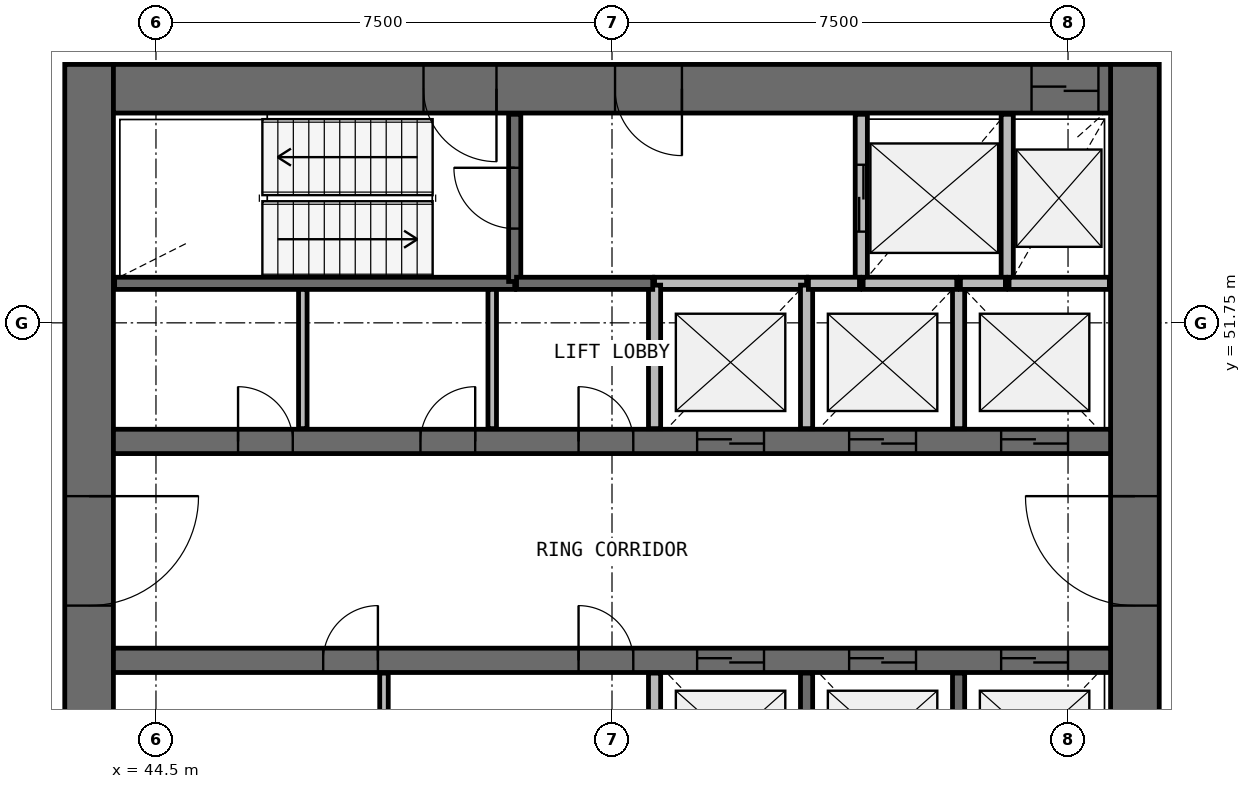
"""IFC4 building model, lengths in metres.
Left out: names, types, materials, properties, quantities, classifications, styles, units other than length and angle.
Written with IfcOpenShell. Run it as: python <this file> out.ifc"""

import sys

from ifc_helpers import new_model, si_unit, direction, frame, frame_2d, origin, place, context, subcontext, project, spatial, rectangle, extrude, source, transform, mapped, element, fill, save


model = new_model("IFC4")
c1 = context("Model", 3, precision=1e-05, world=origin(), true_north=direction((0.0, 1.0)))
c2 = subcontext(c1, "Body", "Model", "MODEL_VIEW")
j1 = project(units=[si_unit("LENGTHUNIT", "METRE"), si_unit("PLANEANGLEUNIT", "RADIAN")], contexts=[c1])
p1 = place(None, origin())
s1 = spatial("IfcSite", under=j1, at=p1, CompositionType="ELEMENT")
p2 = place(p1, origin())
s2 = spatial("IfcBuilding", under=s1, at=p2, CompositionType="ELEMENT")
p3 = place(p2, frame((0.0, 0.0, 144.8)))
s3 = spatial("IfcBuildingStorey", under=s2, at=p3, CompositionType="ELEMENT", Elevation=144.8)
p4 = place(p3, frame((60.6, 40.0, 0.0), z_axis=(0.0, 0.0, 1.0), x_axis=(0.0, 1.0, 0.0)))
e1 = element("IfcWall", 1, at=p4, inside=s3, PredefinedType="SHEAR", context=c2, shape_type="SweptSolid", body=[
    extrude(rectangle(XDim=16.0, YDim=0.8, at=frame_2d((8.0, 0.0))), origin(), (0.0, 0.0, 1.0), 3.9),
])
p5 = place(p4, frame((7.1, 0.0, 0.0)))
e2 = element("IfcOpeningElement", 2, at=p5, cuts=e1, PredefinedType="OPENING", context=c2, shape_type="SweptSolid", body=[
    extrude(rectangle(XDim=1.8, YDim=2.1, at=frame_2d((0.9, 1.05))), frame((0.0, 0.41, 0.0), z_axis=(0.0, -1.0, 0.0), x_axis=(1.0, 0.0, 0.0)), (0.0, 0.0, 1.0), 0.82),
])
p6 = place(p3, frame((43.4, 56.0, 0.0), z_axis=(0.0, 0.0, 1.0), x_axis=(0.0, -1.0, 0.0)))
e3 = element("IfcWall", 3, at=p6, inside=s3, PredefinedType="SHEAR", context=c2, shape_type="SweptSolid", body=[
    extrude(rectangle(XDim=16.0, YDim=0.8, at=frame_2d((8.0, 0.0))), origin(), (0.0, 0.0, 1.0), 3.9),
])
p7 = place(p6, frame((7.1, 0.0, 0.0)))
e4 = element("IfcOpeningElement", 4, at=p7, cuts=e3, PredefinedType="OPENING", context=c2, shape_type="SweptSolid", body=[
    extrude(rectangle(XDim=1.8, YDim=2.1, at=frame_2d((0.9, 1.05))), frame((0.0, 0.41, 0.0), z_axis=(0.0, -1.0, 0.0), x_axis=(1.0, 0.0, 0.0)), (0.0, 0.0, 1.0), 0.82),
])
p8 = place(p3, frame((60.2, 55.6, 0.0), z_axis=(0.0, 0.0, 1.0), x_axis=(-1.0, 0.0, 0.0)))
e5 = element("IfcWall", 5, at=p8, inside=s3, PredefinedType="SHEAR", context=c2, shape_type="SweptSolid", body=[
    extrude(rectangle(XDim=16.4, YDim=0.8, at=frame_2d((8.2, 0.0))), origin(), (0.0, 0.0, 1.0), 3.9),
])
p9 = place(p8, frame((0.2, 0.0, 0.0)))
e6 = element("IfcOpeningElement", 6, at=p9, cuts=e5, PredefinedType="OPENING", context=c2, shape_type="SweptSolid", body=[
    extrude(rectangle(XDim=1.1, YDim=2.1, at=frame_2d((0.55, 1.05))), frame((0.0, 0.41, 0.0), z_axis=(0.0, -1.0, 0.0), x_axis=(1.0, 0.0, 0.0)), (0.0, 0.0, 1.0), 0.82),
])
p10 = place(p8, frame((10.1, 0.0, 0.0)))
e7 = element("IfcOpeningElement", 7, at=p10, cuts=e5, PredefinedType="OPENING", context=c2, shape_type="SweptSolid", body=[
    extrude(rectangle(XDim=1.2, YDim=2.1, at=frame_2d((0.6, 1.05))), frame((0.0, 0.41, 0.0), z_axis=(0.0, -1.0, 0.0), x_axis=(1.0, 0.0, 0.0)), (0.0, 0.0, 1.0), 0.82),
])
p11 = place(p8, frame((7.05, 0.0, 0.0)))
e8 = element("IfcOpeningElement", 8, at=p11, cuts=e5, PredefinedType="OPENING", context=c2, shape_type="SweptSolid", body=[
    extrude(rectangle(XDim=1.1, YDim=2.1, at=frame_2d((0.55, 1.05))), frame((0.0, 0.41, 0.0), z_axis=(0.0, -1.0, 0.0), x_axis=(1.0, 0.0, 0.0)), (0.0, 0.0, 1.0), 0.82),
])
p12 = place(p3, frame((43.8, 49.8, 0.0), z_axis=(0.0, 0.0, 1.0), x_axis=(1.0, 0.0, 0.0)))
e9 = element("IfcWall", 9, at=p12, inside=s3, PredefinedType="SHEAR", context=c2, shape_type="SweptSolid", body=[
    extrude(rectangle(XDim=16.4, YDim=0.4, at=frame_2d((8.2, 0.0))), origin(), (0.0, 0.0, 1.0), 3.9),
])
p13 = place(p12, frame((9.6, 0.0, 0.0)))
e10 = element("IfcOpeningElement", 10, at=p13, cuts=e9, PredefinedType="OPENING", context=c2, shape_type="SweptSolid", body=[
    extrude(rectangle(XDim=1.1, YDim=2.1, at=frame_2d((0.55, 1.05))), frame((0.0, 0.21, 0.0), z_axis=(0.0, -1.0, 0.0), x_axis=(1.0, 0.0, 0.0)), (0.0, 0.0, 1.0), 0.42),
])
p14 = place(p12, frame((12.1, 0.0, 0.0)))
e11 = element("IfcOpeningElement", 11, at=p14, cuts=e9, PredefinedType="OPENING", context=c2, shape_type="SweptSolid", body=[
    extrude(rectangle(XDim=1.1, YDim=2.1, at=frame_2d((0.55, 1.05))), frame((0.0, 0.21, 0.0), z_axis=(0.0, -1.0, 0.0), x_axis=(1.0, 0.0, 0.0)), (0.0, 0.0, 1.0), 0.42),
])
p15 = place(p12, frame((14.6, 0.0, 0.0)))
e12 = element("IfcOpeningElement", 12, at=p15, cuts=e9, PredefinedType="OPENING", context=c2, shape_type="SweptSolid", body=[
    extrude(rectangle(XDim=1.1, YDim=2.1, at=frame_2d((0.55, 1.05))), frame((0.0, 0.21, 0.0), z_axis=(0.0, -1.0, 0.0), x_axis=(1.0, 0.0, 0.0)), (0.0, 0.0, 1.0), 0.42),
])
p16 = place(p12, frame((2.05, 0.0, 0.0)))
e13 = element("IfcOpeningElement", 13, at=p16, cuts=e9, PredefinedType="OPENING", context=c2, shape_type="SweptSolid", body=[
    extrude(rectangle(XDim=0.9, YDim=2.1, at=frame_2d((0.45, 1.05))), frame((0.0, 0.21, 0.0), z_axis=(0.0, -1.0, 0.0), x_axis=(1.0, 0.0, 0.0)), (0.0, 0.0, 1.0), 0.42),
])
p17 = place(p12, frame((5.05, 0.0, 0.0)))
e14 = element("IfcOpeningElement", 14, at=p17, cuts=e9, PredefinedType="OPENING", context=c2, shape_type="SweptSolid", body=[
    extrude(rectangle(XDim=0.9, YDim=2.1, at=frame_2d((0.45, 1.05))), frame((0.0, 0.21, 0.0), z_axis=(0.0, -1.0, 0.0), x_axis=(1.0, 0.0, 0.0)), (0.0, 0.0, 1.0), 0.42),
])
p18 = place(p12, frame((7.65, 0.0, 0.0)))
e15 = element("IfcOpeningElement", 15, at=p18, cuts=e9, PredefinedType="OPENING", context=c2, shape_type="SweptSolid", body=[
    extrude(rectangle(XDim=0.9, YDim=2.1, at=frame_2d((0.45, 1.05))), frame((0.0, 0.21, 0.0), z_axis=(0.0, -1.0, 0.0), x_axis=(1.0, 0.0, 0.0)), (0.0, 0.0, 1.0), 0.42),
])
p19 = place(p3, frame((43.8, 46.2, 0.0), z_axis=(0.0, 0.0, 1.0), x_axis=(1.0, 0.0, 0.0)))
e16 = element("IfcWall", 16, at=p19, inside=s3, PredefinedType="SHEAR", context=c2, shape_type="SweptSolid", body=[
    extrude(rectangle(XDim=16.4, YDim=0.4, at=frame_2d((8.2, 0.0))), origin(), (0.0, 0.0, 1.0), 3.9),
])
p20 = place(p19, frame((9.6, 0.0, 0.0)))
e17 = element("IfcOpeningElement", 17, at=p20, cuts=e16, PredefinedType="OPENING", context=c2, shape_type="SweptSolid", body=[
    extrude(rectangle(XDim=1.1, YDim=2.1, at=frame_2d((0.55, 1.05))), frame((0.0, 0.21, 0.0), z_axis=(0.0, -1.0, 0.0), x_axis=(1.0, 0.0, 0.0)), (0.0, 0.0, 1.0), 0.42),
])
p21 = place(p19, frame((12.1, 0.0, 0.0)))
e18 = element("IfcOpeningElement", 18, at=p21, cuts=e16, PredefinedType="OPENING", context=c2, shape_type="SweptSolid", body=[
    extrude(rectangle(XDim=1.1, YDim=2.1, at=frame_2d((0.55, 1.05))), frame((0.0, 0.21, 0.0), z_axis=(0.0, -1.0, 0.0), x_axis=(1.0, 0.0, 0.0)), (0.0, 0.0, 1.0), 0.42),
])
p22 = place(p19, frame((14.6, 0.0, 0.0)))
e19 = element("IfcOpeningElement", 19, at=p22, cuts=e16, PredefinedType="OPENING", context=c2, shape_type="SweptSolid", body=[
    extrude(rectangle(XDim=1.1, YDim=2.1, at=frame_2d((0.55, 1.05))), frame((0.0, 0.21, 0.0), z_axis=(0.0, -1.0, 0.0), x_axis=(1.0, 0.0, 0.0)), (0.0, 0.0, 1.0), 0.42),
])
p23 = place(p19, frame((3.45, 0.0, 0.0)))
e20 = element("IfcOpeningElement", 20, at=p23, cuts=e16, PredefinedType="OPENING", context=c2, shape_type="SweptSolid", body=[
    extrude(rectangle(XDim=0.9, YDim=2.1, at=frame_2d((0.45, 1.05))), frame((0.0, 0.21, 0.0), z_axis=(0.0, -1.0, 0.0), x_axis=(1.0, 0.0, 0.0)), (0.0, 0.0, 1.0), 0.42),
])
p24 = place(p19, frame((7.65, 0.0, 0.0)))
e21 = element("IfcOpeningElement", 21, at=p24, cuts=e16, PredefinedType="OPENING", context=c2, shape_type="SweptSolid", body=[
    extrude(rectangle(XDim=0.9, YDim=2.1, at=frame_2d((0.45, 1.05))), frame((0.0, 0.21, 0.0), z_axis=(0.0, -1.0, 0.0), x_axis=(1.0, 0.0, 0.0)), (0.0, 0.0, 1.0), 0.42),
])
p25 = place(p3, frame((43.82, 52.4, 0.0), z_axis=(0.0, 0.0, 1.0), x_axis=(1.0, 0.0, 0.0)))
e22 = element("IfcWall", 22, at=p25, inside=s3, PredefinedType="SOLIDWALL", context=c2, shape_type="SweptSolid", body=[
    extrude(rectangle(XDim=6.58, YDim=0.2, at=frame_2d((3.29, 0.0))), origin(), (0.0, 0.0, 1.0), 3.58),
])
p26 = place(p3, frame((50.4, 52.43, 0.0), z_axis=(0.0, 0.0, 1.0), x_axis=(0.0, 1.0, 0.0)))
e23 = element("IfcWall", 23, at=p26, inside=s3, PredefinedType="SOLIDWALL", context=c2, shape_type="SweptSolid", body=[
    extrude(rectangle(XDim=2.75, YDim=0.2, at=frame_2d((1.375, 0.0))), origin(), (0.0, 0.0, 1.0), 3.58),
])
p27 = place(p26, frame((0.87, 0.0, 0.0)))
e24 = element("IfcOpeningElement", 24, at=p27, cuts=e23, PredefinedType="OPENING", context=c2, shape_type="SweptSolid", body=[
    extrude(rectangle(XDim=1.0, YDim=2.1, at=frame_2d((0.5, 1.05))), frame((0.0, 0.11, 0.0), z_axis=(0.0, -1.0, 0.0), x_axis=(1.0, 0.0, 0.0)), (0.0, 0.0, 1.0), 0.22),
])
p28 = place(p3, frame((56.1, 55.18, 0.0), z_axis=(0.0, 0.0, 1.0), x_axis=(0.0, -1.0, 0.0)))
e25 = element("IfcWall", 25, at=p28, inside=s3, PredefinedType="SOLIDWALL", context=c2, shape_type="SweptSolid", body=[
    extrude(rectangle(XDim=2.78, YDim=0.2, at=frame_2d((1.39, 0.0))), origin(), (0.0, 0.0, 1.0), 3.58),
])
p29 = place(p28, frame((0.83, 0.0, 0.0)))
e26 = element("IfcOpeningElement", 26, at=p29, cuts=e25, PredefinedType="OPENING", context=c2, shape_type="SweptSolid", body=[
    extrude(rectangle(XDim=1.1, YDim=2.1, at=frame_2d((0.55, 1.05))), frame((0.0, 0.11, 0.0), z_axis=(0.0, -1.0, 0.0), x_axis=(1.0, 0.0, 0.0)), (0.0, 0.0, 1.0), 0.22),
])
p30 = place(p3, frame((58.5, 52.4, 0.0), z_axis=(0.0, 0.0, 1.0), x_axis=(0.0, 1.0, 0.0)))
e27 = element("IfcWall", 27, at=p30, inside=s3, PredefinedType="SOLIDWALL", context=c2, shape_type="SweptSolid", body=[
    extrude(rectangle(XDim=2.78, YDim=0.2, at=frame_2d((1.39, 0.0))), origin(), (0.0, 0.0, 1.0), 3.58),
])
p31 = place(p3, frame((55.2, 52.4, 0.0), z_axis=(0.0, 0.0, 1.0), x_axis=(-1.0, 0.0, 0.0)))
e28 = element("IfcWall", 28, at=p31, inside=s3, PredefinedType="SOLIDWALL", context=c2, shape_type="SweptSolid", body=[
    extrude(rectangle(XDim=2.5, YDim=0.2, at=frame_2d((1.25, 0.0))), origin(), (0.0, 0.0, 1.0), 3.58),
])
for number, where, z_axis, x_axis in (
    (29, (52.7, 45.99, 0.0), (0.0, 0.0, 1.0), (0.0, -1.0, 0.0)),
    (30, (52.7, 52.37, 0.0), (0.0, 0.0, 1.0), (0.0, -1.0, 0.0)),
    (31, (55.2, 43.63, 0.0), (0.0, 0.0, 1.0), (0.0, 1.0, 0.0)),
    (32, (55.2, 50.01, 0.0), (0.0, 0.0, 1.0), (0.0, 1.0, 0.0)),
    (33, (57.7, 43.63, 0.0), (0.0, 0.0, 1.0), (0.0, 1.0, 0.0)),
):
    element("IfcWall", number, at=place(p3, frame(where, z_axis=z_axis, x_axis=x_axis)), inside=s3, PredefinedType="SOLIDWALL", context=c2, shape_type="SweptSolid", body=[
        extrude(rectangle(XDim=2.36, YDim=0.2, at=frame_2d((1.18, 0.0))), origin(), (0.0, 0.0, 1.0), 3.58),
    ])
p32 = place(p3, frame((57.7, 50.01, 0.0), z_axis=(0.0, 0.0, 1.0), x_axis=(0.0, 1.0, 0.0)))
e34 = element("IfcWall", 34, at=p32, inside=s3, PredefinedType="SOLIDWALL", context=c2, shape_type="SweptSolid", body=[
    extrude(rectangle(XDim=2.39, YDim=0.2, at=frame_2d((1.195, 0.0))), origin(), (0.0, 0.0, 1.0), 3.58),
])
p33 = place(p3, frame((50.43, 52.4, 0.0), z_axis=(0.0, 0.0, 1.0), x_axis=(1.0, 0.0, 0.0)))
e35 = element("IfcWall", 35, at=p33, inside=s3, PredefinedType="SOLIDWALL", context=c2, shape_type="SweptSolid", body=[
    extrude(rectangle(XDim=2.24, YDim=0.2, at=frame_2d((1.12, 0.0))), origin(), (0.0, 0.0, 1.0), 3.58),
])
p34 = place(p3, frame((60.18, 52.4, 0.0), z_axis=(0.0, 0.0, 1.0), x_axis=(-1.0, 0.0, 0.0)))
e36 = element("IfcWall", 36, at=p34, inside=s3, PredefinedType="SOLIDWALL", context=c2, shape_type="SweptSolid", body=[
    extrude(rectangle(XDim=1.65, YDim=0.2, at=frame_2d((0.825, 0.0))), origin(), (0.0, 0.0, 1.0), 3.58),
])
p35 = place(p3, frame((57.67, 52.4, 0.0), z_axis=(0.0, 0.0, 1.0), x_axis=(-1.0, 0.0, 0.0)))
e37 = element("IfcWall", 37, at=p35, inside=s3, PredefinedType="SOLIDWALL", context=c2, shape_type="SweptSolid", body=[
    extrude(rectangle(XDim=1.54, YDim=0.2, at=frame_2d((0.77, 0.0))), origin(), (0.0, 0.0, 1.0), 3.58),
])
p36 = place(p3, frame((56.07, 52.4, 0.0), z_axis=(0.0, 0.0, 1.0), x_axis=(-1.0, 0.0, 0.0)))
e38 = element("IfcWall", 38, at=p36, inside=s3, PredefinedType="SOLIDWALL", context=c2, shape_type="SweptSolid", body=[
    extrude(rectangle(XDim=0.84, YDim=0.2, at=frame_2d((0.42, 0.0))), origin(), (0.0, 0.0, 1.0), 3.58),
])
p37 = place(p3, frame((58.47, 52.4, 0.0), z_axis=(0.0, 0.0, 1.0), x_axis=(-1.0, 0.0, 0.0)))
e39 = element("IfcWall", 39, at=p37, inside=s3, PredefinedType="SOLIDWALL", context=c2, shape_type="SweptSolid", body=[
    extrude(rectangle(XDim=0.74, YDim=0.2, at=frame_2d((0.37, 0.0))), origin(), (0.0, 0.0, 1.0), 3.58),
])
for number, where, z_axis, x_axis in (
    (40, (46.915, 50.01, 0.0), (0.0, 0.0, 1.0), (0.0, 1.0, 0.0)),
    (41, (48.25, 43.7, 0.0), (0.0, 0.0, 1.0), (0.0, 1.0, 0.0)),
    (42, (50.03, 50.01, 0.0), (0.0, 0.0, 1.0), (0.0, 1.0, 0.0)),
):
    element("IfcWall", number, at=place(p3, frame(where, z_axis=z_axis, x_axis=x_axis)), inside=s3, PredefinedType="PARTITIONING", context=c2, shape_type="SweptSolid", body=[
        extrude(rectangle(XDim=2.29, YDim=0.14, at=frame_2d((1.145, 0.0))), origin(), (0.0, 0.0, 1.0), 2.88),
    ])
m1 = source(origin(), c2, "Body", "SweptSolid", [
    extrude(rectangle(XDim=1.8, YDim=2.1, at=frame_2d((0.9, 1.05))), frame((0.0, 0.025, 0.0), z_axis=(0.0, -1.0, 0.0), x_axis=(1.0, 0.0, 0.0)), (0.0, 0.0, 1.0), 0.05),
])
p38 = place(p7, origin())
e43 = element("IfcDoor", 43, at=p38, inside=s3, OperationType="SINGLE_SWING_LEFT", PredefinedType="DOOR", context=c2, shape_type="MappedRepresentation", body=[
    mapped(m1, transform((0.0, 0.0, 0.0), scale=1.0)),
])
fill(e4, e43)
p39 = place(p5, origin())
e44 = element("IfcDoor", 44, at=p39, inside=s3, OperationType="SINGLE_SWING_RIGHT", PredefinedType="DOOR", context=c2, shape_type="MappedRepresentation", body=[
    mapped(m1, transform((0.0, 0.0, 0.0), scale=1.0)),
])
fill(e2, e44)
m2 = source(origin(), c2, "Body", "SweptSolid", [
    extrude(rectangle(XDim=1.1, YDim=2.1, at=frame_2d((0.55, 1.05))), frame((0.0, 0.025, 0.0), z_axis=(0.0, -1.0, 0.0), x_axis=(1.0, 0.0, 0.0)), (0.0, 0.0, 1.0), 0.05),
])
p40 = place(p13, origin())
e45 = element("IfcDoor", 45, at=p40, inside=s3, OperationType="DOUBLE_DOOR_SLIDING", PredefinedType="USERDEFINED", context=c2, shape_type="MappedRepresentation", body=[
    mapped(m2, transform((0.0, 0.0, 0.0), scale=1.0)),
])
fill(e10, e45)
p41 = place(p14, origin())
e46 = element("IfcDoor", 46, at=p41, inside=s3, OperationType="DOUBLE_DOOR_SLIDING", PredefinedType="USERDEFINED", context=c2, shape_type="MappedRepresentation", body=[
    mapped(m2, transform((0.0, 0.0, 0.0), scale=1.0)),
])
fill(e11, e46)
p42 = place(p15, origin())
e47 = element("IfcDoor", 47, at=p42, inside=s3, OperationType="DOUBLE_DOOR_SLIDING", PredefinedType="USERDEFINED", context=c2, shape_type="MappedRepresentation", body=[
    mapped(m2, transform((0.0, 0.0, 0.0), scale=1.0)),
])
fill(e12, e47)
p43 = place(p20, origin())
e48 = element("IfcDoor", 48, at=p43, inside=s3, OperationType="DOUBLE_DOOR_SLIDING", PredefinedType="USERDEFINED", context=c2, shape_type="MappedRepresentation", body=[
    mapped(m2, transform((0.0, 0.0, 0.0), scale=1.0)),
])
fill(e17, e48)
p44 = place(p21, origin())
e49 = element("IfcDoor", 49, at=p44, inside=s3, OperationType="DOUBLE_DOOR_SLIDING", PredefinedType="USERDEFINED", context=c2, shape_type="MappedRepresentation", body=[
    mapped(m2, transform((0.0, 0.0, 0.0), scale=1.0)),
])
fill(e18, e49)
p45 = place(p22, origin())
e50 = element("IfcDoor", 50, at=p45, inside=s3, OperationType="DOUBLE_DOOR_SLIDING", PredefinedType="USERDEFINED", context=c2, shape_type="MappedRepresentation", body=[
    mapped(m2, transform((0.0, 0.0, 0.0), scale=1.0)),
])
fill(e19, e50)
p46 = place(p29, origin())
e51 = element("IfcDoor", 51, at=p46, inside=s3, OperationType="DOUBLE_DOOR_SLIDING", PredefinedType="USERDEFINED", context=c2, shape_type="MappedRepresentation", body=[
    mapped(m2, transform((0.0, 0.0, 0.0), scale=1.0)),
])
fill(e26, e51)
p47 = place(p9, origin())
e52 = element("IfcDoor", 52, at=p47, inside=s3, OperationType="DOUBLE_DOOR_SLIDING", PredefinedType="USERDEFINED", context=c2, shape_type="MappedRepresentation", body=[
    mapped(m2, transform((0.0, 0.0, 0.0), scale=1.0)),
])
fill(e6, e52)
m3 = source(origin(), c2, "Body", "SweptSolid", [
    extrude(rectangle(XDim=1.2, YDim=2.1, at=frame_2d((0.6, 1.05))), frame((0.0, 0.025, 0.0), z_axis=(0.0, -1.0, 0.0), x_axis=(1.0, 0.0, 0.0)), (0.0, 0.0, 1.0), 0.05),
])
p48 = place(p10, origin())
e53 = element("IfcDoor", 53, at=p48, inside=s3, OperationType="SINGLE_SWING_LEFT", PredefinedType="DOOR", context=c2, shape_type="MappedRepresentation", body=[
    mapped(m3, transform((0.0, 0.0, 0.0), scale=1.0)),
])
fill(e7, e53)
m4 = source(origin(), c2, "Body", "SweptSolid", [
    extrude(rectangle(XDim=1.0, YDim=2.1, at=frame_2d((0.5, 1.05))), frame((0.0, 0.025, 0.0), z_axis=(0.0, -1.0, 0.0), x_axis=(1.0, 0.0, 0.0)), (0.0, 0.0, 1.0), 0.05),
])
p49 = place(p27, origin())
e54 = element("IfcDoor", 54, at=p49, inside=s3, OperationType="SINGLE_SWING_RIGHT", PredefinedType="DOOR", context=c2, shape_type="MappedRepresentation", body=[
    mapped(m4, transform((0.0, 0.0, 0.0), scale=1.0)),
])
fill(e24, e54)
m5 = source(origin(), c2, "Body", "SweptSolid", [
    extrude(rectangle(XDim=1.1, YDim=2.1, at=frame_2d((0.55, 1.05))), frame((0.0, 0.025, 0.0), z_axis=(0.0, -1.0, 0.0), x_axis=(1.0, 0.0, 0.0)), (0.0, 0.0, 1.0), 0.05),
])
p50 = place(p11, origin())
e55 = element("IfcDoor", 55, at=p50, inside=s3, OperationType="SINGLE_SWING_LEFT", PredefinedType="DOOR", context=c2, shape_type="MappedRepresentation", body=[
    mapped(m5, transform((0.0, 0.0, 0.0), scale=1.0)),
])
fill(e8, e55)
m6 = source(origin(), c2, "Body", "SweptSolid", [
    extrude(rectangle(XDim=0.9, YDim=2.1, at=frame_2d((0.45, 1.05))), frame((0.0, 0.025, 0.0), z_axis=(0.0, -1.0, 0.0), x_axis=(1.0, 0.0, 0.0)), (0.0, 0.0, 1.0), 0.05),
])
p51 = place(p16, origin())
e56 = element("IfcDoor", 56, at=p51, inside=s3, OperationType="SINGLE_SWING_LEFT", PredefinedType="DOOR", context=c2, shape_type="MappedRepresentation", body=[
    mapped(m6, transform((0.0, 0.0, 0.0), scale=1.0)),
])
fill(e13, e56)
p52 = place(p17, origin())
e57 = element("IfcDoor", 57, at=p52, inside=s3, OperationType="SINGLE_SWING_RIGHT", PredefinedType="DOOR", context=c2, shape_type="MappedRepresentation", body=[
    mapped(m6, transform((0.0, 0.0, 0.0), scale=1.0)),
])
fill(e14, e57)
p53 = place(p18, origin())
e58 = element("IfcDoor", 58, at=p53, inside=s3, OperationType="SINGLE_SWING_LEFT", PredefinedType="DOOR", context=c2, shape_type="MappedRepresentation", body=[
    mapped(m6, transform((0.0, 0.0, 0.0), scale=1.0)),
])
fill(e15, e58)
p54 = place(p23, origin())
e59 = element("IfcDoor", 59, at=p54, inside=s3, OperationType="SINGLE_SWING_RIGHT", PredefinedType="DOOR", context=c2, shape_type="MappedRepresentation", body=[
    mapped(m6, transform((0.0, 0.0, 0.0), scale=1.0)),
])
fill(e20, e59)
p55 = place(p24, origin())
e60 = element("IfcDoor", 60, at=p55, inside=s3, OperationType="SINGLE_SWING_LEFT", PredefinedType="DOOR", context=c2, shape_type="MappedRepresentation", body=[
    mapped(m6, transform((0.0, 0.0, 0.0), scale=1.0)),
])
fill(e21, e60)
save(model, sys.argv[1])
